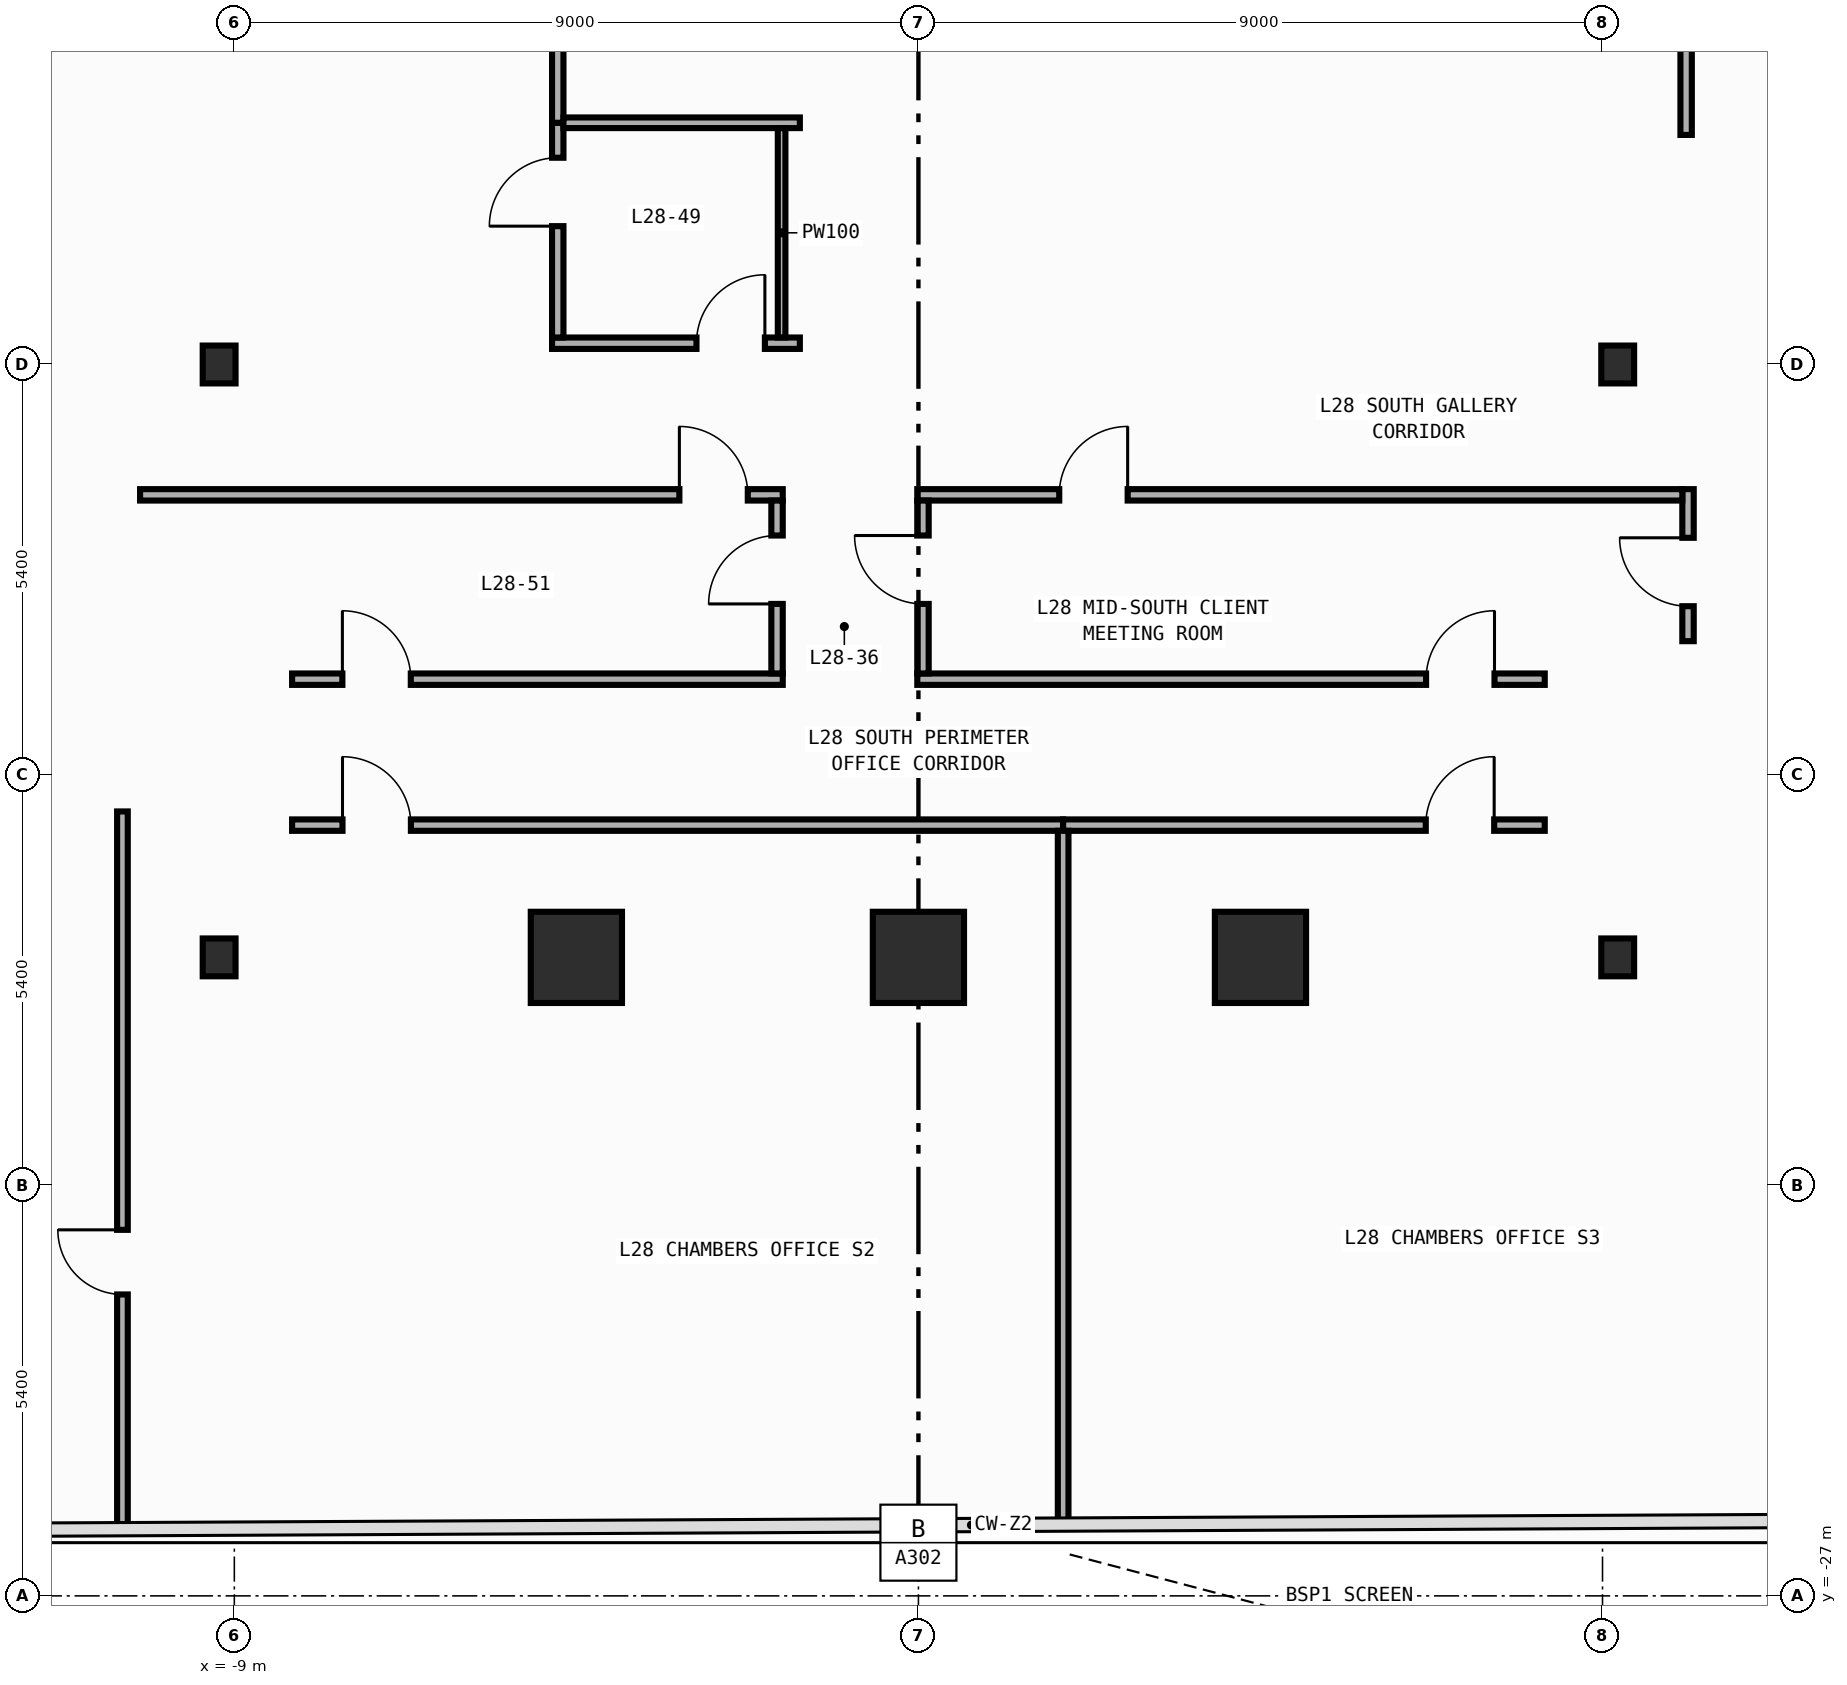
"""IFC4 building model, lengths in metres.
Left out: names, types, materials, properties, quantities, classifications, styles, units other than length and angle.
Written with IfcOpenShell. Run it as: python <this file> out.ifc"""

import sys

from ifc_helpers import new_model, si_unit, direction, frame, frame_2d, origin, origin_2d, place, context, subcontext, project, spatial, rectangle, i_section, extrude, element, fill, save


model = new_model("IFC4")
c1 = context("Model", 3, precision=1e-05, world=origin(), true_north=direction((0.0, 1.0)))
c2 = subcontext(c1, "Body", "Model", "MODEL_VIEW")
j1 = project(units=[si_unit("LENGTHUNIT", "METRE"), si_unit("PLANEANGLEUNIT", "RADIAN")], contexts=[c1])
p1 = place(None, origin())
s1 = spatial("IfcSite", under=j1, at=p1, CompositionType="ELEMENT")
p2 = place(p1, origin())
s2 = spatial("IfcBuilding", under=s1, at=p2, CompositionType="ELEMENT")
p3 = place(p2, frame((0.0, 0.0, 122.6)))
s3 = spatial("IfcBuildingStorey", under=s2, at=p3, CompositionType="ELEMENT", Elevation=122.6)
for number, where, z_axis, x_axis in (
    (1, (-9.2, -18.6, 0.0), (0.0, 0.0, 1.0), (1.0, 0.0, 0.0)),
    (2, (-9.2, -10.8, 0.0), (0.0, 0.0, 1.0), (1.0, 0.0, 0.0)),
    (3, (9.2, -18.6, 0.0), (0.0, 0.0, 1.0), (1.0, 0.0, 0.0)),
    (4, (9.2, -10.8, 0.0), (0.0, 0.0, 1.0), (1.0, 0.0, 0.0)),
):
    element("IfcColumn", number, at=place(p3, frame(where, z_axis=z_axis, x_axis=x_axis)), inside=s3, PredefinedType="COLUMN", context=c2, shape_type="SweptSolid", body=[
        extrude(i_section(OverallWidth=0.432, OverallDepth=0.498, WebThickness=0.045, FlangeThickness=0.07, FilletRadius=0.022, at=origin_2d()), origin(), (0.0, 0.0, 1.0), 4.2),
    ])
for number, where, z_axis, x_axis in (
    (5, (-4.5, -18.6, 0.0), (0.0, 0.0, 1.0), (1.0, 0.0, 0.0)),
    (6, (0.0, -18.6, 0.0), (0.0, 0.0, 1.0), (1.0, 0.0, 0.0)),
    (7, (4.5, -18.6, 0.0), (0.0, 0.0, 1.0), (1.0, 0.0, 0.0)),
):
    element("IfcColumn", number, at=place(p3, frame(where, z_axis=z_axis, x_axis=x_axis)), inside=s3, PredefinedType="COLUMN", context=c2, shape_type="SweptSolid", body=[
        extrude(rectangle(XDim=1.2, YDim=1.2, at=origin_2d()), origin(), (0.0, 0.0, 1.0), 4.2),
    ])
p4 = place(p3, frame((10.1, -7.78, 0.0), z_axis=(0.0, 0.0, 1.0), x_axis=(0.0, 1.0, 0.0)))
e8 = element("IfcWall", 8, at=p4, inside=s3, PredefinedType="PARTITIONING", context=c2, shape_type="SweptSolid", body=[
    extrude(rectangle(XDim=17.375, YDim=0.15, at=frame_2d((8.688, 0.0))), origin(), (0.0, 0.0, 1.0), 3.94),
])
p5 = place(p4, frame((12.783, 0.0, 0.0)))
e9 = element("IfcOpeningElement", 9, at=p5, cuts=e8, PredefinedType="OPENING", context=c2, shape_type="SweptSolid", body=[
    extrude(rectangle(XDim=0.9, YDim=2.15, at=frame_2d((0.45, 1.075))), frame((0.0, 0.085, 0.0), z_axis=(0.0, -1.0, 0.0), x_axis=(1.0, 0.0, 0.0)), (0.0, 0.0, 1.0), 0.17),
])
p6 = place(p3, frame((10.125, -14.44, 0.0), z_axis=(0.0, 0.0, 1.0), x_axis=(0.0, 1.0, 0.0)))
e10 = element("IfcWall", 10, at=p6, inside=s3, PredefinedType="PARTITIONING", context=c2, shape_type="SweptSolid", body=[
    extrude(rectangle(XDim=2.0, YDim=0.15, at=frame_2d((1.0, 0.0))), origin(), (0.0, 0.0, 1.0), 3.94),
])
p7 = place(p6, frame((0.46, 0.0, 0.0)))
e11 = element("IfcOpeningElement", 11, at=p7, cuts=e10, PredefinedType="OPENING", context=c2, shape_type="SweptSolid", body=[
    extrude(rectangle(XDim=0.9, YDim=2.15, at=frame_2d((0.45, 1.075))), frame((0.0, 0.085, 0.0), z_axis=(0.0, -1.0, 0.0), x_axis=(1.0, 0.0, 0.0)), (0.0, 0.0, 1.0), 0.17),
])
p8 = place(p3, frame((-4.82, -10.52, 0.0), z_axis=(0.0, 0.0, 1.0), x_axis=(1.0, 0.0, 0.0)))
e12 = element("IfcWall", 12, at=p8, inside=s3, PredefinedType="PARTITIONING", context=c2, shape_type="SweptSolid", body=[
    extrude(rectangle(XDim=3.26, YDim=0.15, at=frame_2d((1.63, 0.0))), origin(), (0.0, 0.0, 1.0), 3.24),
])
p9 = place(p8, frame((1.9, 0.0, 0.0)))
e13 = element("IfcOpeningElement", 13, at=p9, cuts=e12, PredefinedType="OPENING", context=c2, shape_type="SweptSolid", body=[
    extrude(rectangle(XDim=0.9, YDim=2.15, at=frame_2d((0.45, 1.075))), frame((0.0, 0.085, 0.0), z_axis=(0.0, -1.0, 0.0), x_axis=(1.0, 0.0, 0.0)), (0.0, 0.0, 1.0), 0.17),
])
p10 = place(p3, frame((-10.24, -12.515, 0.0), z_axis=(0.0, 0.0, 1.0), x_axis=(1.0, 0.0, 0.0)))
e14 = element("IfcWall", 14, at=p10, inside=s3, PredefinedType="PARTITIONING", context=c2, shape_type="SweptSolid", body=[
    extrude(rectangle(XDim=8.455, YDim=0.15, at=frame_2d((4.228, 0.0))), origin(), (0.0, 0.0, 1.0), 3.94),
])
p11 = place(p10, frame((7.095, 0.0, 0.0)))
e15 = element("IfcOpeningElement", 15, at=p11, cuts=e14, PredefinedType="OPENING", context=c2, shape_type="SweptSolid", body=[
    extrude(rectangle(XDim=0.9, YDim=2.15, at=frame_2d((0.45, 1.075))), frame((0.0, 0.085, 0.0), z_axis=(0.0, -1.0, 0.0), x_axis=(1.0, 0.0, 0.0)), (0.0, 0.0, 1.0), 0.17),
])
p12 = place(p3, frame((-0.015, -12.515, 0.0), z_axis=(0.0, 0.0, 1.0), x_axis=(1.0, 0.0, 0.0)))
e16 = element("IfcWall", 16, at=p12, inside=s3, PredefinedType="PARTITIONING", context=c2, shape_type="SweptSolid", body=[
    extrude(rectangle(XDim=10.065, YDim=0.15, at=frame_2d((5.032, 0.0))), origin(), (0.0, 0.0, 1.0), 3.94),
])
p13 = place(p12, frame((1.868, 0.0, 0.0)))
e17 = element("IfcOpeningElement", 17, at=p13, cuts=e16, PredefinedType="OPENING", context=c2, shape_type="SweptSolid", body=[
    extrude(rectangle(XDim=0.9, YDim=2.15, at=frame_2d((0.45, 1.075))), frame((0.0, 0.085, 0.0), z_axis=(0.0, -1.0, 0.0), x_axis=(1.0, 0.0, 0.0)), (0.0, 0.0, 1.0), 0.17),
])
p14 = place(p3, frame((-4.745, -10.445, 0.0), z_axis=(0.0, 0.0, 1.0), x_axis=(0.0, 1.0, 0.0)))
e18 = element("IfcWall", 18, at=p14, inside=s3, PredefinedType="PARTITIONING", context=c2, shape_type="SweptSolid", body=[
    extrude(rectangle(XDim=2.825, YDim=0.15, at=frame_2d((1.413, 0.0))), origin(), (0.0, 0.0, 1.0), 3.49),
])
p15 = place(p14, frame((1.465, 0.0, 0.0)))
e19 = element("IfcOpeningElement", 19, at=p15, cuts=e18, PredefinedType="OPENING", context=c2, shape_type="SweptSolid", body=[
    extrude(rectangle(XDim=0.9, YDim=2.15, at=frame_2d((0.45, 1.075))), frame((0.0, 0.085, 0.0), z_axis=(0.0, -1.0, 0.0), x_axis=(1.0, 0.0, 0.0)), (0.0, 0.0, 1.0), 0.17),
])
p16 = place(p3, frame((-4.745, -7.62, 0.0), z_axis=(0.0, 0.0, 1.0), x_axis=(0.0, 1.0, 0.0)))
e20 = element("IfcWall", 20, at=p16, inside=s3, PredefinedType="PARTITIONING", context=c2, shape_type="SweptSolid", body=[
    extrude(rectangle(XDim=17.065, YDim=0.15, at=frame_2d((8.533, 0.0))), origin(), (0.0, 0.0, 1.0), 3.49),
])
p17 = place(p16, frame((12.496, 0.0, 0.0)))
e21 = element("IfcOpeningElement", 21, at=p17, cuts=e20, PredefinedType="OPENING", context=c2, shape_type="SweptSolid", body=[
    extrude(rectangle(XDim=0.9, YDim=2.15, at=frame_2d((0.45, 1.075))), frame((0.0, 0.085, 0.0), z_axis=(0.0, -1.0, 0.0), x_axis=(1.0, 0.0, 0.0)), (0.0, 0.0, 1.0), 0.17),
])
p18 = place(p3, frame((-8.24, -16.86, 0.0), z_axis=(0.0, 0.0, 1.0), x_axis=(1.0, 0.0, 0.0)))
e22 = element("IfcWall", 22, at=p18, inside=s3, PredefinedType="PARTITIONING", context=c2, shape_type="SweptSolid", body=[
    extrude(rectangle(XDim=10.144, YDim=0.15, at=frame_2d((5.072, 0.0))), origin(), (0.0, 0.0, 1.0), 3.94),
])
p19 = place(p18, frame((0.663, 0.0, 0.0)))
e23 = element("IfcOpeningElement", 23, at=p19, cuts=e22, PredefinedType="OPENING", context=c2, shape_type="SweptSolid", body=[
    extrude(rectangle(XDim=0.9, YDim=2.15, at=frame_2d((0.45, 1.075))), frame((0.0, 0.085, 0.0), z_axis=(0.0, -1.0, 0.0), x_axis=(1.0, 0.0, 0.0)), (0.0, 0.0, 1.0), 0.17),
])
p20 = place(p3, frame((1.904, -16.86, 0.0), z_axis=(0.0, 0.0, 1.0), x_axis=(1.0, 0.0, 0.0)))
e24 = element("IfcWall", 24, at=p20, inside=s3, PredefinedType="PARTITIONING", context=c2, shape_type="SweptSolid", body=[
    extrude(rectangle(XDim=6.336, YDim=0.15, at=frame_2d((3.168, 0.0))), origin(), (0.0, 0.0, 1.0), 3.94),
])
p21 = place(p20, frame((4.771, 0.0, 0.0)))
e25 = element("IfcOpeningElement", 25, at=p21, cuts=e24, PredefinedType="OPENING", context=c2, shape_type="SweptSolid", body=[
    extrude(rectangle(XDim=0.9, YDim=2.15, at=frame_2d((0.45, 1.075))), frame((0.0, 0.085, 0.0), z_axis=(0.0, -1.0, 0.0), x_axis=(1.0, 0.0, 0.0)), (0.0, 0.0, 1.0), 0.17),
])
p22 = place(p3, frame((-8.24, -14.94, 0.0), z_axis=(0.0, 0.0, 1.0), x_axis=(1.0, 0.0, 0.0)))
e26 = element("IfcWall", 26, at=p22, inside=s3, PredefinedType="PARTITIONING", context=c2, shape_type="SweptSolid", body=[
    extrude(rectangle(XDim=6.455, YDim=0.15, at=frame_2d((3.228, 0.0))), origin(), (0.0, 0.0, 1.0), 3.94),
])
p23 = place(p22, frame((0.662, 0.0, 0.0)))
e27 = element("IfcOpeningElement", 27, at=p23, cuts=e26, PredefinedType="OPENING", context=c2, shape_type="SweptSolid", body=[
    extrude(rectangle(XDim=0.9, YDim=2.15, at=frame_2d((0.45, 1.075))), frame((0.0, 0.085, 0.0), z_axis=(0.0, -1.0, 0.0), x_axis=(1.0, 0.0, 0.0)), (0.0, 0.0, 1.0), 0.17),
])
p24 = place(p3, frame((-0.015, -14.94, 0.0), z_axis=(0.0, 0.0, 1.0), x_axis=(1.0, 0.0, 0.0)))
e28 = element("IfcWall", 28, at=p24, inside=s3, PredefinedType="PARTITIONING", context=c2, shape_type="SweptSolid", body=[
    extrude(rectangle(XDim=8.255, YDim=0.15, at=frame_2d((4.127, 0.0))), origin(), (0.0, 0.0, 1.0), 3.94),
])
p25 = place(p24, frame((6.694, 0.0, 0.0)))
e29 = element("IfcOpeningElement", 29, at=p25, cuts=e28, PredefinedType="OPENING", context=c2, shape_type="SweptSolid", body=[
    extrude(rectangle(XDim=0.9, YDim=2.15, at=frame_2d((0.45, 1.075))), frame((0.0, 0.085, 0.0), z_axis=(0.0, -1.0, 0.0), x_axis=(1.0, 0.0, 0.0)), (0.0, 0.0, 1.0), 0.17),
])
p26 = place(p3, frame((-1.86, -14.865, 0.0), z_axis=(0.0, 0.0, 1.0), x_axis=(0.0, 1.0, 0.0)))
e30 = element("IfcWall", 30, at=p26, inside=s3, PredefinedType="PARTITIONING", context=c2, shape_type="SweptSolid", body=[
    extrude(rectangle(XDim=2.275, YDim=0.15, at=frame_2d((1.137, 0.0))), origin(), (0.0, 0.0, 1.0), 3.94),
])
p27 = place(p26, frame((0.915, 0.0, 0.0)))
e31 = element("IfcOpeningElement", 31, at=p27, cuts=e30, PredefinedType="OPENING", context=c2, shape_type="SweptSolid", body=[
    extrude(rectangle(XDim=0.9, YDim=2.15, at=frame_2d((0.45, 1.075))), frame((0.0, 0.085, 0.0), z_axis=(0.0, -1.0, 0.0), x_axis=(1.0, 0.0, 0.0)), (0.0, 0.0, 1.0), 0.17),
])
p28 = place(p3, frame((0.06, -14.865, 0.0), z_axis=(0.0, 0.0, 1.0), x_axis=(0.0, 1.0, 0.0)))
e32 = element("IfcWall", 32, at=p28, inside=s3, PredefinedType="PARTITIONING", context=c2, shape_type="SweptSolid", body=[
    extrude(rectangle(XDim=2.275, YDim=0.15, at=frame_2d((1.137, 0.0))), origin(), (0.0, 0.0, 1.0), 3.94),
])
p29 = place(p28, frame((0.915, 0.0, 0.0)))
e33 = element("IfcOpeningElement", 33, at=p29, cuts=e32, PredefinedType="OPENING", context=c2, shape_type="SweptSolid", body=[
    extrude(rectangle(XDim=0.9, YDim=2.15, at=frame_2d((0.45, 1.075))), frame((0.0, 0.085, 0.0), z_axis=(0.0, -1.0, 0.0), x_axis=(1.0, 0.0, 0.0)), (0.0, 0.0, 1.0), 0.17),
])
p30 = place(p3, frame((-10.472, -26.118, 0.0), z_axis=(0.0, 0.0, 1.0), x_axis=(0.0, 1.0, 0.0)))
e34 = element("IfcWall", 34, at=p30, inside=s3, PredefinedType="PARTITIONING", context=c2, shape_type="SweptSolid", body=[
    extrude(rectangle(XDim=9.438, YDim=0.14, at=frame_2d((4.719, 0.0))), origin(), (0.0, 0.0, 1.0), 3.94),
])
p31 = place(p30, frame((3.083, 0.0, 0.0)))
e35 = element("IfcOpeningElement", 35, at=p31, cuts=e34, PredefinedType="OPENING", context=c2, shape_type="SweptSolid", body=[
    extrude(rectangle(XDim=0.85, YDim=2.1, at=frame_2d((0.425, 1.05))), frame((0.0, 0.08, 0.0), z_axis=(0.0, -1.0, 0.0), x_axis=(1.0, 0.0, 0.0)), (0.0, 0.0, 1.0), 0.16),
])
p32 = place(p3, frame((1.904, -26.057, 0.0), z_axis=(0.0, 0.0, 1.0), x_axis=(0.0, 1.0, 0.0)))
e36 = element("IfcWall", 36, at=p32, inside=s3, PredefinedType="PARTITIONING", context=c2, shape_type="SweptSolid", body=[
    extrude(rectangle(XDim=9.122, YDim=0.14, at=frame_2d((4.561, 0.0))), origin(), (0.0, 0.0, 1.0), 3.94),
])
p33 = place(p3, frame((-4.67, -7.62, 0.0), z_axis=(0.0, 0.0, 1.0), x_axis=(1.0, 0.0, 0.0)))
e37 = element("IfcWall", 37, at=p33, inside=s3, PredefinedType="PARTITIONING", context=c2, shape_type="SweptSolid", body=[
    extrude(rectangle(XDim=3.11, YDim=0.14, at=frame_2d((1.555, 0.0))), origin(), (0.0, 0.0, 1.0), 3.94),
])
p34 = place(p3, frame((-1.8, -7.69, 0.0), z_axis=(0.0, 0.0, 1.0), x_axis=(0.0, -1.0, 0.0)))
e38 = element("IfcWall", 38, at=p34, inside=s3, PredefinedType="PARTITIONING", context=c2, shape_type="SweptSolid", body=[
    extrude(rectangle(XDim=2.755, YDim=0.1, at=frame_2d((1.377, 0.0))), origin(), (0.0, 0.0, 1.0), 3.94),
])
p35 = place(p7, origin())
e39 = element("IfcDoor", 39, at=p35, inside=s3, OperationType="SINGLE_SWING_RIGHT", PredefinedType="DOOR", context=c2, shape_type="SweptSolid", body=[
    extrude(rectangle(XDim=0.9, YDim=2.15, at=frame_2d((0.45, 1.075))), frame((0.0, 0.025, 0.0), z_axis=(0.0, -1.0, 0.0), x_axis=(1.0, 0.0, 0.0)), (0.0, 0.0, 1.0), 0.05),
])
fill(e11, e39)
p36 = place(p9, origin())
e40 = element("IfcDoor", 40, at=p36, inside=s3, OperationType="SINGLE_SWING_RIGHT", PredefinedType="DOOR", context=c2, shape_type="SweptSolid", body=[
    extrude(rectangle(XDim=0.9, YDim=2.15, at=frame_2d((0.45, 1.075))), frame((0.0, 0.025, 0.0), z_axis=(0.0, -1.0, 0.0), x_axis=(1.0, 0.0, 0.0)), (0.0, 0.0, 1.0), 0.05),
])
fill(e13, e40)
p37 = place(p11, origin())
e41 = element("IfcDoor", 41, at=p37, inside=s3, OperationType="SINGLE_SWING_LEFT", PredefinedType="DOOR", context=c2, shape_type="SweptSolid", body=[
    extrude(rectangle(XDim=0.9, YDim=2.15, at=frame_2d((0.45, 1.075))), frame((0.0, 0.025, 0.0), z_axis=(0.0, -1.0, 0.0), x_axis=(1.0, 0.0, 0.0)), (0.0, 0.0, 1.0), 0.05),
])
fill(e15, e41)
p38 = place(p13, origin())
e42 = element("IfcDoor", 42, at=p38, inside=s3, OperationType="SINGLE_SWING_RIGHT", PredefinedType="DOOR", context=c2, shape_type="SweptSolid", body=[
    extrude(rectangle(XDim=0.9, YDim=2.15, at=frame_2d((0.45, 1.075))), frame((0.0, 0.025, 0.0), z_axis=(0.0, -1.0, 0.0), x_axis=(1.0, 0.0, 0.0)), (0.0, 0.0, 1.0), 0.05),
])
fill(e17, e42)
p39 = place(p15, origin())
e43 = element("IfcDoor", 43, at=p39, inside=s3, OperationType="SINGLE_SWING_LEFT", PredefinedType="DOOR", context=c2, shape_type="SweptSolid", body=[
    extrude(rectangle(XDim=0.9, YDim=2.15, at=frame_2d((0.45, 1.075))), frame((0.0, 0.025, 0.0), z_axis=(0.0, -1.0, 0.0), x_axis=(1.0, 0.0, 0.0)), (0.0, 0.0, 1.0), 0.05),
])
fill(e19, e43)
p40 = place(p19, origin())
e44 = element("IfcDoor", 44, at=p40, inside=s3, OperationType="SINGLE_SWING_LEFT", PredefinedType="DOOR", context=c2, shape_type="SweptSolid", body=[
    extrude(rectangle(XDim=0.9, YDim=2.15, at=frame_2d((0.45, 1.075))), frame((0.0, 0.025, 0.0), z_axis=(0.0, -1.0, 0.0), x_axis=(1.0, 0.0, 0.0)), (0.0, 0.0, 1.0), 0.05),
])
fill(e23, e44)
p41 = place(p21, origin())
e45 = element("IfcDoor", 45, at=p41, inside=s3, OperationType="SINGLE_SWING_RIGHT", PredefinedType="DOOR", context=c2, shape_type="SweptSolid", body=[
    extrude(rectangle(XDim=0.9, YDim=2.15, at=frame_2d((0.45, 1.075))), frame((0.0, 0.025, 0.0), z_axis=(0.0, -1.0, 0.0), x_axis=(1.0, 0.0, 0.0)), (0.0, 0.0, 1.0), 0.05),
])
fill(e25, e45)
p42 = place(p23, origin())
e46 = element("IfcDoor", 46, at=p42, inside=s3, OperationType="SINGLE_SWING_LEFT", PredefinedType="DOOR", context=c2, shape_type="SweptSolid", body=[
    extrude(rectangle(XDim=0.9, YDim=2.15, at=frame_2d((0.45, 1.075))), frame((0.0, 0.025, 0.0), z_axis=(0.0, -1.0, 0.0), x_axis=(1.0, 0.0, 0.0)), (0.0, 0.0, 1.0), 0.05),
])
fill(e27, e46)
p43 = place(p25, origin())
e47 = element("IfcDoor", 47, at=p43, inside=s3, OperationType="SINGLE_SWING_RIGHT", PredefinedType="DOOR", context=c2, shape_type="SweptSolid", body=[
    extrude(rectangle(XDim=0.9, YDim=2.15, at=frame_2d((0.45, 1.075))), frame((0.0, 0.025, 0.0), z_axis=(0.0, -1.0, 0.0), x_axis=(1.0, 0.0, 0.0)), (0.0, 0.0, 1.0), 0.05),
])
fill(e29, e47)
p44 = place(p27, origin())
e48 = element("IfcDoor", 48, at=p44, inside=s3, OperationType="SINGLE_SWING_LEFT", PredefinedType="DOOR", context=c2, shape_type="SweptSolid", body=[
    extrude(rectangle(XDim=0.9, YDim=2.15, at=frame_2d((0.45, 1.075))), frame((0.0, 0.025, 0.0), z_axis=(0.0, -1.0, 0.0), x_axis=(1.0, 0.0, 0.0)), (0.0, 0.0, 1.0), 0.05),
])
fill(e31, e48)
p45 = place(p29, origin())
e49 = element("IfcDoor", 49, at=p45, inside=s3, OperationType="SINGLE_SWING_RIGHT", PredefinedType="DOOR", context=c2, shape_type="SweptSolid", body=[
    extrude(rectangle(XDim=0.9, YDim=2.15, at=frame_2d((0.45, 1.075))), frame((0.0, 0.025, 0.0), z_axis=(0.0, -1.0, 0.0), x_axis=(1.0, 0.0, 0.0)), (0.0, 0.0, 1.0), 0.05),
])
fill(e33, e49)
p46 = place(p31, origin())
e50 = element("IfcDoor", 50, at=p46, inside=s3, OperationType="SINGLE_SWING_RIGHT", PredefinedType="DOOR", context=c2, shape_type="SweptSolid", body=[
    extrude(rectangle(XDim=0.85, YDim=2.1, at=frame_2d((0.425, 1.05))), frame((0.0, 0.025, 0.0), z_axis=(0.0, -1.0, 0.0), x_axis=(1.0, 0.0, 0.0)), (0.0, 0.0, 1.0), 0.05),
])
fill(e35, e50)
save(model, sys.argv[1])
